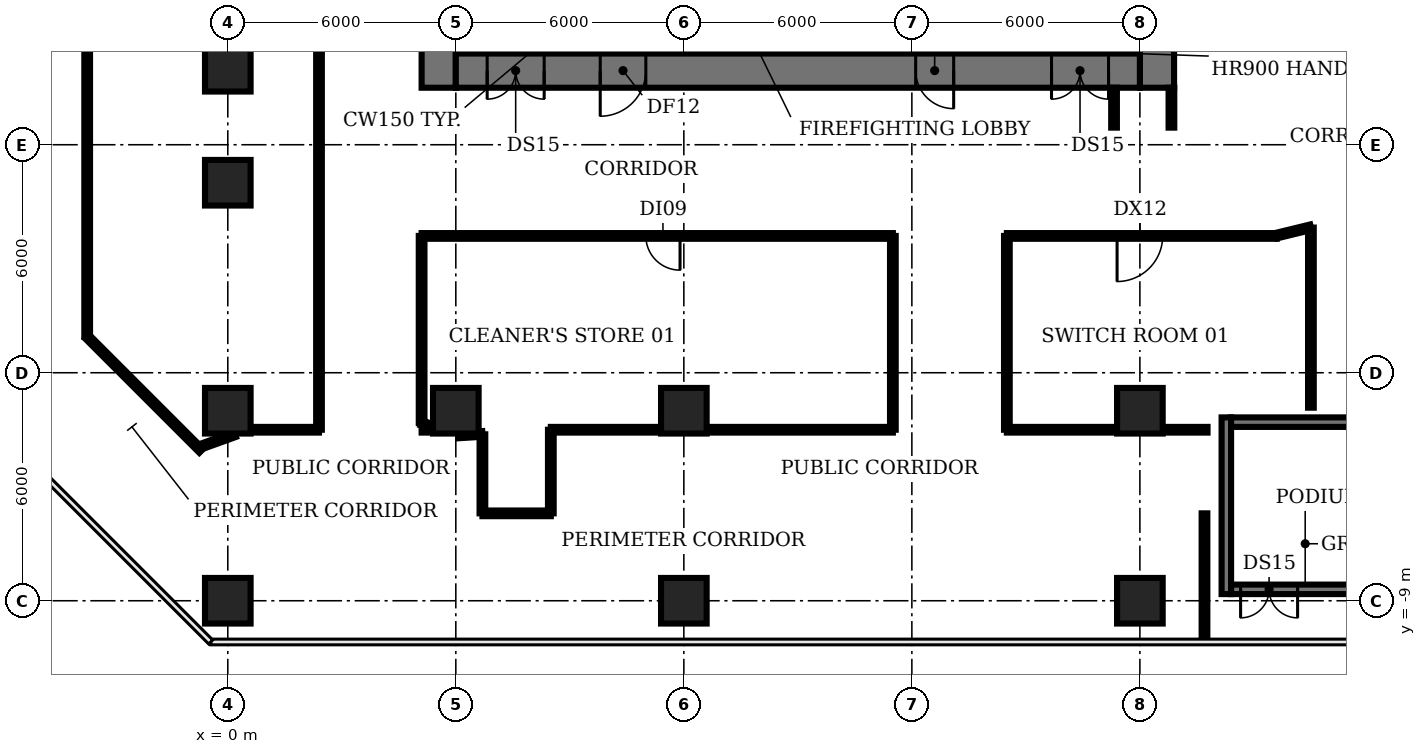
"""IFC4 building model, lengths in metres.
Left out: names, types, materials, properties, quantities, classifications, styles, units other than length and angle.
Written with IfcOpenShell. Run it as: python <this file> out.ifc"""

import sys

from ifc_helpers import new_model, si_unit, direction, frame, frame_2d, origin, origin_2d, place, context, subcontext, project, spatial, rectangle, extrude, element, fill, save


model = new_model("IFC4")
c1 = context("Model", 3, precision=1e-05, world=origin(), true_north=direction((0.0, 1.0)))
c2 = subcontext(c1, "Body", "Model", "MODEL_VIEW")
j1 = project(units=[si_unit("LENGTHUNIT", "METRE"), si_unit("PLANEANGLEUNIT", "RADIAN")], contexts=[c1])
p1 = place(None, origin())
s1 = spatial("IfcSite", under=j1, at=p1, CompositionType="ELEMENT")
p2 = place(p1, origin())
s2 = spatial("IfcBuilding", under=s1, at=p2, CompositionType="ELEMENT")
p3 = place(p2, frame((0.0, 0.0, 6.0)))
s3 = spatial("IfcBuildingStorey", under=s2, at=p3, CompositionType="ELEMENT", Elevation=6.0)
for number, where, z_axis, x_axis in (
    (1, (0.0, -9.0, 0.0), (0.0, 0.0, 1.0), (1.0, 0.0, 0.0)),
    (2, (0.0, -4.0, 0.0), (0.0, 0.0, 1.0), (1.0, 0.0, 0.0)),
    (3, (0.0, 2.0, 0.0), (0.0, 0.0, 1.0), (1.0, 0.0, 0.0)),
    (4, (0.0, 5.0, 0.0), (0.0, 0.0, 1.0), (1.0, 0.0, 0.0)),
    (5, (6.0, -4.0, 0.0), (0.0, 0.0, 1.0), (1.0, 0.0, 0.0)),
    (6, (12.0, -9.0, 0.0), (0.0, 0.0, 1.0), (1.0, 0.0, 0.0)),
    (7, (12.0, -4.0, 0.0), (0.0, 0.0, 1.0), (1.0, 0.0, 0.0)),
    (8, (24.0, -9.0, 0.0), (0.0, 0.0, 1.0), (1.0, 0.0, 0.0)),
    (9, (24.0, -4.0, 0.0), (0.0, 0.0, 1.0), (1.0, 0.0, 0.0)),
):
    element("IfcColumn", number, at=place(p3, frame(where, z_axis=z_axis, x_axis=x_axis)), inside=s3, PredefinedType="COLUMN", context=c2, shape_type="SweptSolid", body=[
        extrude(rectangle(XDim=1.2, YDim=1.2, at=origin_2d()), origin(), (0.0, 0.0, 1.0), 4.6),
    ])
p4 = place(p3, frame((9.275, 11.825, 0.0), z_axis=(0.0, 0.0, 1.0), x_axis=(0.0, -1.0, 0.0)))
e10 = element("IfcWall", 10, at=p4, inside=s3, PredefinedType="SHEAR", context=c2, shape_type="SweptSolid", body=[
    extrude(rectangle(XDim=6.425, YDim=0.25, at=frame_2d((3.212, 0.0))), origin(), (0.0, 0.0, 1.0), 4.6),
])
p5 = place(p4, frame((5.075, 0.0, 0.0)))
e11 = element("IfcOpeningElement", 11, at=p5, cuts=e10, PredefinedType="OPENING", context=c2, shape_type="SweptSolid", body=[
    extrude(rectangle(XDim=1.0, YDim=2.1, at=frame_2d((0.5, 1.05))), frame((0.0, 0.135, 0.0), z_axis=(0.0, -1.0, 0.0), x_axis=(1.0, 0.0, 0.0)), (0.0, 0.0, 1.0), 0.27),
])
p6 = place(p3, frame((13.5, 5.4, 0.0), z_axis=(0.0, 0.0, 1.0), x_axis=(0.0, 1.0, 0.0)))
e12 = element("IfcWall", 12, at=p6, inside=s3, PredefinedType="SHEAR", context=c2, shape_type="SweptSolid", body=[
    extrude(rectangle(XDim=8.2, YDim=0.2, at=frame_2d((4.1, 0.0))), origin(), (0.0, 0.0, 1.0), 4.6),
])
p7 = place(p6, frame((0.75, 0.0, 0.0)))
e13 = element("IfcOpeningElement", 13, at=p7, cuts=e12, PredefinedType="OPENING", context=c2, shape_type="SweptSolid", body=[
    extrude(rectangle(XDim=1.1, YDim=2.1, at=frame_2d((0.55, 1.05))), frame((0.0, 0.11, 0.0), z_axis=(0.0, -1.0, 0.0), x_axis=(1.0, 0.0, 0.0)), (0.0, 0.0, 1.0), 0.22),
])
p8 = place(p6, frame((3.55, 0.0, 0.0)))
e14 = element("IfcOpeningElement", 14, at=p8, cuts=e12, PredefinedType="OPENING", context=c2, shape_type="SweptSolid", body=[
    extrude(rectangle(XDim=1.1, YDim=2.1, at=frame_2d((0.55, 1.05))), frame((0.0, 0.11, 0.0), z_axis=(0.0, -1.0, 0.0), x_axis=(1.0, 0.0, 0.0)), (0.0, 0.0, 1.0), 0.22),
])
p9 = place(p6, frame((6.35, 0.0, 0.0)))
e15 = element("IfcOpeningElement", 15, at=p9, cuts=e12, PredefinedType="OPENING", context=c2, shape_type="SweptSolid", body=[
    extrude(rectangle(XDim=1.1, YDim=2.1, at=frame_2d((0.55, 1.05))), frame((0.0, 0.11, 0.0), z_axis=(0.0, -1.0, 0.0), x_axis=(1.0, 0.0, 0.0)), (0.0, 0.0, 1.0), 0.22),
])
p10 = place(p3, frame((16.5, 5.4, 0.0), z_axis=(0.0, 0.0, 1.0), x_axis=(0.0, 1.0, 0.0)))
e16 = element("IfcWall", 16, at=p10, inside=s3, PredefinedType="SHEAR", context=c2, shape_type="SweptSolid", body=[
    extrude(rectangle(XDim=8.2, YDim=0.2, at=frame_2d((4.1, 0.0))), origin(), (0.0, 0.0, 1.0), 4.6),
])
p11 = place(p3, frame((20.725, 5.4, 0.0), z_axis=(0.0, 0.0, 1.0), x_axis=(0.0, 1.0, 0.0)))
e17 = element("IfcWall", 17, at=p11, inside=s3, PredefinedType="SHEAR", context=c2, shape_type="SweptSolid", body=[
    extrude(rectangle(XDim=6.3, YDim=0.25, at=frame_2d((3.15, 0.0))), origin(), (0.0, 0.0, 1.0), 4.6),
])
p12 = place(p3, frame((5.55, 4.5, 0.0), z_axis=(0.0, 0.0, 1.0), x_axis=(0.0, 1.0, 0.0)))
e18 = element("IfcWall", 18, at=p12, inside=s3, PredefinedType="SHEAR", context=c2, shape_type="SweptSolid", body=[
    extrude(rectangle(XDim=21.2, YDim=0.9, at=frame_2d((10.6, 0.0))), origin(), (0.0, 0.0, 1.0), 4.6),
])
p13 = place(p12, frame((7.6, 0.0, 0.0)))
e19 = element("IfcOpeningElement", 19, at=p13, cuts=e18, PredefinedType="OPENING", context=c2, shape_type="SweptSolid", body=[
    extrude(rectangle(XDim=1.2, YDim=2.1, at=frame_2d((0.6, 1.05))), frame((0.0, 0.46, 0.0), z_axis=(0.0, -1.0, 0.0), x_axis=(1.0, 0.0, 0.0)), (0.0, 0.0, 1.0), 0.92),
])
p14 = place(p12, frame((14.15, 0.0, 0.0)))
e20 = element("IfcOpeningElement", 20, at=p14, cuts=e18, PredefinedType="OPENING", context=c2, shape_type="SweptSolid", body=[
    extrude(rectangle(XDim=1.2, YDim=2.1, at=frame_2d((0.6, 1.05))), frame((0.0, 0.46, 0.0), z_axis=(0.0, -1.0, 0.0), x_axis=(1.0, 0.0, 0.0)), (0.0, 0.0, 1.0), 0.92),
])
p15 = place(p3, frame((24.45, 25.7, 0.0), z_axis=(0.0, 0.0, 1.0), x_axis=(0.0, -1.0, 0.0)))
e21 = element("IfcWall", 21, at=p15, inside=s3, PredefinedType="SHEAR", context=c2, shape_type="SweptSolid", body=[
    extrude(rectangle(XDim=21.2, YDim=0.9, at=frame_2d((10.6, 0.0))), origin(), (0.0, 0.0, 1.0), 4.6),
])
p16 = place(p15, frame((12.45, 0.0, 0.0)))
e22 = element("IfcOpeningElement", 22, at=p16, cuts=e21, PredefinedType="OPENING", context=c2, shape_type="SweptSolid", body=[
    extrude(rectangle(XDim=0.9, YDim=2.1, at=frame_2d((0.45, 1.05))), frame((0.0, 0.46, 0.0), z_axis=(0.0, -1.0, 0.0), x_axis=(1.0, 0.0, 0.0)), (0.0, 0.0, 1.0), 0.92),
])
p17 = place(p15, frame((6.45, 0.0, 0.0)))
e23 = element("IfcOpeningElement", 23, at=p17, cuts=e21, PredefinedType="OPENING", context=c2, shape_type="SweptSolid", body=[
    extrude(rectangle(XDim=2.0, YDim=2.1, at=frame_2d((1.0, 1.05))), frame((0.0, 0.46, 0.0), z_axis=(0.0, -1.0, 0.0), x_axis=(1.0, 0.0, 0.0)), (0.0, 0.0, 1.0), 0.92),
])
p18 = place(p3, frame((24.0, 4.95, 0.0), z_axis=(0.0, 0.0, 1.0), x_axis=(-1.0, 0.0, 0.0)))
e24 = element("IfcWall", 24, at=p18, inside=s3, PredefinedType="SHEAR", context=c2, shape_type="SweptSolid", body=[
    extrude(rectangle(XDim=18.0, YDim=0.9, at=frame_2d((9.0, 0.0))), origin(), (0.0, 0.0, 1.0), 4.6),
])
p19 = place(p18, frame((15.675, 0.0, 0.0)))
e25 = element("IfcOpeningElement", 25, at=p19, cuts=e24, PredefinedType="OPENING", context=c2, shape_type="SweptSolid", body=[
    extrude(rectangle(XDim=1.5, YDim=2.1, at=frame_2d((0.75, 1.05))), frame((0.0, 0.46, 0.0), z_axis=(0.0, -1.0, 0.0), x_axis=(1.0, 0.0, 0.0)), (0.0, 0.0, 1.0), 0.92),
])
p20 = place(p18, frame((0.825, 0.0, 0.0)))
e26 = element("IfcOpeningElement", 26, at=p20, cuts=e24, PredefinedType="OPENING", context=c2, shape_type="SweptSolid", body=[
    extrude(rectangle(XDim=1.5, YDim=2.1, at=frame_2d((0.75, 1.05))), frame((0.0, 0.46, 0.0), z_axis=(0.0, -1.0, 0.0), x_axis=(1.0, 0.0, 0.0)), (0.0, 0.0, 1.0), 0.92),
])
p21 = place(p18, frame((13.0, 0.0, 0.0)))
e27 = element("IfcOpeningElement", 27, at=p21, cuts=e24, PredefinedType="OPENING", context=c2, shape_type="SweptSolid", body=[
    extrude(rectangle(XDim=1.2, YDim=2.1, at=frame_2d((0.6, 1.05))), frame((0.0, 0.46, 0.0), z_axis=(0.0, -1.0, 0.0), x_axis=(1.0, 0.0, 0.0)), (0.0, 0.0, 1.0), 0.92),
])
p22 = place(p18, frame((4.9, 0.0, 0.0)))
e28 = element("IfcOpeningElement", 28, at=p22, cuts=e24, PredefinedType="OPENING", context=c2, shape_type="SweptSolid", body=[
    extrude(rectangle(XDim=1.0, YDim=2.1, at=frame_2d((0.5, 1.05))), frame((0.0, 0.46, 0.0), z_axis=(0.0, -1.0, 0.0), x_axis=(1.0, 0.0, 0.0)), (0.0, 0.0, 1.0), 0.92),
])
p23 = place(p3, frame((26.275, -8.825, 0.0), z_axis=(0.0, 0.0, 1.0), x_axis=(0.0, 1.0, 0.0)))
e29 = element("IfcWall", 29, at=p23, inside=s3, PredefinedType="SHEAR", context=c2, shape_type="SweptSolid", body=[
    extrude(rectangle(XDim=4.65, YDim=0.25, at=frame_2d((2.325, 0.0))), origin(), (0.0, 0.0, 1.0), 4.6),
])
p24 = place(p3, frame((34.6, -8.7, 0.0), z_axis=(0.0, 0.0, 1.0), x_axis=(-1.0, 0.0, 0.0)))
e30 = element("IfcWall", 30, at=p24, inside=s3, PredefinedType="SHEAR", context=c2, shape_type="SweptSolid", body=[
    extrude(rectangle(XDim=8.2, YDim=0.25, at=frame_2d((4.1, 0.0))), origin(), (0.0, 0.0, 1.0), 4.6),
])
p25 = place(p24, frame((6.45, 0.0, 0.0)))
e31 = element("IfcOpeningElement", 31, at=p25, cuts=e30, PredefinedType="OPENING", context=c2, shape_type="SweptSolid", body=[
    extrude(rectangle(XDim=1.5, YDim=2.1, at=frame_2d((0.75, 1.05))), frame((0.0, 0.135, 0.0), z_axis=(0.0, -1.0, 0.0), x_axis=(1.0, 0.0, 0.0)), (0.0, 0.0, 1.0), 0.27),
])
p26 = place(p3, frame((26.4, -4.3, 0.0), z_axis=(0.0, 0.0, 1.0), x_axis=(1.0, 0.0, 0.0)))
e32 = element("IfcWall", 32, at=p26, inside=s3, PredefinedType="SHEAR", context=c2, shape_type="SweptSolid", body=[
    extrude(rectangle(XDim=8.2, YDim=0.25, at=frame_2d((4.1, 0.0))), origin(), (0.0, 0.0, 1.0), 4.6),
])
p27 = place(p3, frame((-3.7, -2.05, 0.0), z_axis=(0.0, 0.0, 1.0), x_axis=(0.707106781187, -0.707106781187, 0.0)))
e33 = element("IfcWall", 33, at=p27, inside=s3, PredefinedType="PARTITIONING", context=c2, shape_type="SweptSolid", body=[
    extrude(rectangle(XDim=4.249, YDim=0.15, at=frame_2d((2.125, 0.0))), origin(), (0.0, 0.0, 1.0), 3.18),
])
p28 = place(p3, frame((-3.7, 27.9, 0.0), z_axis=(0.0, 0.0, 1.0), x_axis=(0.0, -1.0, 0.0)))
e34 = element("IfcWall", 34, at=p28, inside=s3, PredefinedType="PARTITIONING", context=c2, shape_type="SweptSolid", body=[
    extrude(rectangle(XDim=29.95, YDim=0.15, at=frame_2d((14.975, 0.0))), origin(), (0.0, 0.0, 1.0), 3.18),
])
p29 = place(p28, frame((11.45, 0.0, 0.0)))
e35 = element("IfcOpeningElement", 35, at=p29, cuts=e34, PredefinedType="OPENING", context=c2, shape_type="SweptSolid", body=[
    extrude(rectangle(XDim=0.9, YDim=2.1, at=frame_2d((0.45, 1.05))), frame((0.0, 0.085, 0.0), z_axis=(0.0, -1.0, 0.0), x_axis=(1.0, 0.0, 0.0)), (0.0, 0.0, 1.0), 0.17),
])
p30 = place(p3, frame((-0.78, -4.97, 0.0), z_axis=(0.0, 0.0, 1.0), x_axis=(0.940681994894, 0.339289528991, 0.0)))
e36 = element("IfcWall", 36, at=p30, inside=s3, PredefinedType="PARTITIONING", context=c2, shape_type="SweptSolid", body=[
    extrude(rectangle(XDim=1.031, YDim=0.15, at=frame_2d((0.516, 0.0))), origin(), (0.0, 0.0, 1.0), 3.18),
])
p31 = place(p3, frame((0.46, -4.5, 0.0), z_axis=(0.0, 0.0, 1.0), x_axis=(1.0, 0.0, 0.0)))
e37 = element("IfcWall", 37, at=p31, inside=s3, PredefinedType="PARTITIONING", context=c2, shape_type="SweptSolid", body=[
    extrude(rectangle(XDim=1.94, YDim=0.15, at=frame_2d((0.97, 0.0))), origin(), (0.0, 0.0, 1.0), 3.18),
])
p32 = place(p3, frame((2.4, -4.5, 0.0), z_axis=(0.0, 0.0, 1.0), x_axis=(0.0, 1.0, 0.0)))
e38 = element("IfcWall", 38, at=p32, inside=s3, PredefinedType="PARTITIONING", context=c2, shape_type="SweptSolid", body=[
    extrude(rectangle(XDim=32.4, YDim=0.15, at=frame_2d((16.2, 0.0))), origin(), (0.0, 0.0, 1.0), 3.18),
])
p33 = place(p3, frame((5.1, -4.5, 0.0), z_axis=(0.0, 0.0, 1.0), x_axis=(1.0, 0.0, 0.0)))
e39 = element("IfcWall", 39, at=p33, inside=s3, PredefinedType="PARTITIONING", context=c2, shape_type="SweptSolid", body=[
    extrude(rectangle(XDim=0.44, YDim=0.15, at=frame_2d((0.22, 0.0))), origin(), (0.0, 0.0, 1.0), 3.18),
])
p34 = place(p3, frame((5.1, -4.32, 0.0), z_axis=(0.0, 0.0, 1.0), x_axis=(0.0, 1.0, 0.0)))
e40 = element("IfcWall", 40, at=p34, inside=s3, PredefinedType="PARTITIONING", context=c2, shape_type="SweptSolid", body=[
    extrude(rectangle(XDim=4.92, YDim=0.15, at=frame_2d((2.46, 0.0))), origin(), (0.0, 0.0, 1.0), 3.18),
])
p35 = place(p3, frame((5.1, -4.32, 0.0), z_axis=(0.0, 0.0, 1.0), x_axis=(0.925579680267, -0.378552843705, 0.0)))
e41 = element("IfcWall", 41, at=p35, inside=s3, PredefinedType="PARTITIONING", context=c2, shape_type="SweptSolid", body=[
    extrude(rectangle(XDim=0.475, YDim=0.15, at=frame_2d((0.238, 0.0))), origin(), (0.0, 0.0, 1.0), 3.18),
])
p36 = place(p3, frame((6.06, -4.65, 0.0), z_axis=(0.0, 0.0, 1.0), x_axis=(0.998071793058, 0.062070088618, 0.0)))
e42 = element("IfcWall", 42, at=p36, inside=s3, PredefinedType="PARTITIONING", context=c2, shape_type="SweptSolid", body=[
    extrude(rectangle(XDim=0.641, YDim=0.15, at=frame_2d((0.321, 0.0))), origin(), (0.0, 0.0, 1.0), 3.18),
])
p37 = place(p3, frame((6.7, -6.7, 0.0), z_axis=(0.0, 0.0, 1.0), x_axis=(0.0, 1.0, 0.0)))
e43 = element("IfcWall", 43, at=p37, inside=s3, PredefinedType="PARTITIONING", context=c2, shape_type="SweptSolid", body=[
    extrude(rectangle(XDim=2.08, YDim=0.15, at=frame_2d((1.04, 0.0))), origin(), (0.0, 0.0, 1.0), 3.18),
])
p38 = place(p3, frame((6.7, -6.7, 0.0), z_axis=(0.0, 0.0, 1.0), x_axis=(1.0, 0.0, 0.0)))
e44 = element("IfcWall", 44, at=p38, inside=s3, PredefinedType="PARTITIONING", context=c2, shape_type="SweptSolid", body=[
    extrude(rectangle(XDim=1.8, YDim=0.15, at=frame_2d((0.9, 0.0))), origin(), (0.0, 0.0, 1.0), 3.18),
])
p39 = place(p3, frame((8.5, -6.7, 0.0), z_axis=(0.0, 0.0, 1.0), x_axis=(0.0, 1.0, 0.0)))
e45 = element("IfcWall", 45, at=p39, inside=s3, PredefinedType="PARTITIONING", context=c2, shape_type="SweptSolid", body=[
    extrude(rectangle(XDim=2.2, YDim=0.15, at=frame_2d((1.1, 0.0))), origin(), (0.0, 0.0, 1.0), 3.18),
])
p40 = place(p3, frame((8.5, -4.5, 0.0), z_axis=(0.0, 0.0, 1.0), x_axis=(1.0, 0.0, 0.0)))
e46 = element("IfcWall", 46, at=p40, inside=s3, PredefinedType="PARTITIONING", context=c2, shape_type="SweptSolid", body=[
    extrude(rectangle(XDim=3.04, YDim=0.15, at=frame_2d((1.52, 0.0))), origin(), (0.0, 0.0, 1.0), 3.18),
])
p41 = place(p3, frame((12.46, -4.5, 0.0), z_axis=(0.0, 0.0, 1.0), x_axis=(1.0, 0.0, 0.0)))
e47 = element("IfcWall", 47, at=p41, inside=s3, PredefinedType="PARTITIONING", context=c2, shape_type="SweptSolid", body=[
    extrude(rectangle(XDim=5.04, YDim=0.15, at=frame_2d((2.52, 0.0))), origin(), (0.0, 0.0, 1.0), 3.18),
])
p42 = place(p3, frame((17.5, -4.5, 0.0), z_axis=(0.0, 0.0, 1.0), x_axis=(0.0, 1.0, 0.0)))
e48 = element("IfcWall", 48, at=p42, inside=s3, PredefinedType="PARTITIONING", context=c2, shape_type="SweptSolid", body=[
    extrude(rectangle(XDim=5.1, YDim=0.15, at=frame_2d((2.55, 0.0))), origin(), (0.0, 0.0, 1.0), 3.18),
])
p43 = place(p3, frame((17.5, 0.6, 0.0), z_axis=(0.0, 0.0, 1.0), x_axis=(-1.0, 0.0, 0.0)))
e49 = element("IfcWall", 49, at=p43, inside=s3, PredefinedType="PARTITIONING", context=c2, shape_type="SweptSolid", body=[
    extrude(rectangle(XDim=12.4, YDim=0.15, at=frame_2d((6.2, 0.0))), origin(), (0.0, 0.0, 1.0), 3.18),
])
p44 = place(p43, frame((5.6, 0.0, 0.0)))
e50 = element("IfcOpeningElement", 50, at=p44, cuts=e49, PredefinedType="OPENING", context=c2, shape_type="SweptSolid", body=[
    extrude(rectangle(XDim=0.9, YDim=2.1, at=frame_2d((0.45, 1.05))), frame((0.0, 0.085, 0.0), z_axis=(0.0, -1.0, 0.0), x_axis=(1.0, 0.0, 0.0)), (0.0, 0.0, 1.0), 0.17),
])
p45 = place(p3, frame((20.5, -4.5, 0.0), z_axis=(0.0, 0.0, 1.0), x_axis=(0.0, 1.0, 0.0)))
e51 = element("IfcWall", 51, at=p45, inside=s3, PredefinedType="PARTITIONING", context=c2, shape_type="SweptSolid", body=[
    extrude(rectangle(XDim=5.1, YDim=0.15, at=frame_2d((2.55, 0.0))), origin(), (0.0, 0.0, 1.0), 3.18),
])
p46 = place(p3, frame((20.5, -4.5, 0.0), z_axis=(0.0, 0.0, 1.0), x_axis=(1.0, 0.0, 0.0)))
e52 = element("IfcWall", 52, at=p46, inside=s3, PredefinedType="PARTITIONING", context=c2, shape_type="SweptSolid", body=[
    extrude(rectangle(XDim=3.04, YDim=0.15, at=frame_2d((1.52, 0.0))), origin(), (0.0, 0.0, 1.0), 3.18),
])
p47 = place(p3, frame((23.32, 3.45, 0.0), z_axis=(0.0, 0.0, 1.0), x_axis=(0.0, 1.0, 0.0)))
e53 = element("IfcWall", 53, at=p47, inside=s3, PredefinedType="PARTITIONING", context=c2, shape_type="SweptSolid", body=[
    extrude(rectangle(XDim=1.05, YDim=0.15, at=frame_2d((0.525, 0.0))), origin(), (0.0, 0.0, 1.0), 3.18),
])
p48 = place(p3, frame((24.46, -4.5, 0.0), z_axis=(0.0, 0.0, 1.0), x_axis=(1.0, 0.0, 0.0)))
e54 = element("IfcWall", 54, at=p48, inside=s3, PredefinedType="PARTITIONING", context=c2, shape_type="SweptSolid", body=[
    extrude(rectangle(XDim=1.32, YDim=0.15, at=frame_2d((0.66, 0.0))), origin(), (0.0, 0.0, 1.0), 3.18),
])
p49 = place(p3, frame((24.83, 3.45, 0.0), z_axis=(0.0, 0.0, 1.0), x_axis=(0.0, 1.0, 0.0)))
e55 = element("IfcWall", 55, at=p49, inside=s3, PredefinedType="PARTITIONING", context=c2, shape_type="SweptSolid", body=[
    extrude(rectangle(XDim=1.05, YDim=0.15, at=frame_2d((0.525, 0.0))), origin(), (0.0, 0.0, 1.0), 3.18),
])
p50 = place(p3, frame((25.7, -10.03, 0.0), z_axis=(0.0, 0.0, 1.0), x_axis=(0.0, 1.0, 0.0)))
e56 = element("IfcWall", 56, at=p50, inside=s3, PredefinedType="PARTITIONING", context=c2, shape_type="SweptSolid", body=[
    extrude(rectangle(XDim=3.33, YDim=0.15, at=frame_2d((1.665, 0.0))), origin(), (0.0, 0.0, 1.0), 3.18),
])
p51 = place(p3, frame((27.6, 0.6, 0.0), z_axis=(0.0, 0.0, 1.0), x_axis=(-1.0, 0.0, 0.0)))
e57 = element("IfcWall", 57, at=p51, inside=s3, PredefinedType="PARTITIONING", context=c2, shape_type="SweptSolid", body=[
    extrude(rectangle(XDim=7.1, YDim=0.15, at=frame_2d((3.55, 0.0))), origin(), (0.0, 0.0, 1.0), 3.18),
])
p52 = place(p51, frame((3.0, 0.0, 0.0)))
e58 = element("IfcOpeningElement", 58, at=p52, cuts=e57, PredefinedType="OPENING", context=c2, shape_type="SweptSolid", body=[
    extrude(rectangle(XDim=1.2, YDim=2.1, at=frame_2d((0.6, 1.05))), frame((0.0, 0.085, 0.0), z_axis=(0.0, -1.0, 0.0), x_axis=(1.0, 0.0, 0.0)), (0.0, 0.0, 1.0), 0.17),
])
p53 = place(p3, frame((27.6, 0.61, 0.0), z_axis=(0.0, 0.0, 1.0), x_axis=(0.971400357327, 0.237447564284, 0.0)))
e59 = element("IfcWall", 59, at=p53, inside=s3, PredefinedType="PARTITIONING", context=c2, shape_type="SweptSolid", body=[
    extrude(rectangle(XDim=0.927, YDim=0.15, at=frame_2d((0.463, 0.0))), origin(), (0.0, 0.0, 1.0), 3.18),
])
p54 = place(p3, frame((28.5, -3.92, 0.0), z_axis=(0.0, 0.0, 1.0), x_axis=(0.0, 1.0, 0.0)))
e60 = element("IfcWall", 60, at=p54, inside=s3, PredefinedType="PARTITIONING", context=c2, shape_type="SweptSolid", body=[
    extrude(rectangle(XDim=4.74, YDim=0.15, at=frame_2d((2.37, 0.0))), origin(), (0.0, 0.0, 1.0), 3.18),
])
p55 = place(p19, origin())
e61 = element("IfcDoor", 61, at=p55, inside=s3, OperationType="DOUBLE_DOOR_SINGLE_SWING", PredefinedType="DOOR", context=c2, shape_type="SweptSolid", body=[
    extrude(rectangle(XDim=1.5, YDim=2.1, at=frame_2d((0.75, 1.05))), frame((0.0, 0.025, 0.0), z_axis=(0.0, -1.0, 0.0), x_axis=(1.0, 0.0, 0.0)), (0.0, 0.0, 1.0), 0.05),
])
fill(e25, e61)
p56 = place(p20, origin())
e62 = element("IfcDoor", 62, at=p56, inside=s3, OperationType="DOUBLE_DOOR_SINGLE_SWING", PredefinedType="DOOR", context=c2, shape_type="SweptSolid", body=[
    extrude(rectangle(XDim=1.5, YDim=2.1, at=frame_2d((0.75, 1.05))), frame((0.0, 0.025, 0.0), z_axis=(0.0, -1.0, 0.0), x_axis=(1.0, 0.0, 0.0)), (0.0, 0.0, 1.0), 0.05),
])
fill(e26, e62)
p57 = place(p21, origin())
e63 = element("IfcDoor", 63, at=p57, inside=s3, OperationType="SINGLE_SWING_RIGHT", PredefinedType="DOOR", context=c2, shape_type="SweptSolid", body=[
    extrude(rectangle(XDim=1.2, YDim=2.1, at=frame_2d((0.6, 1.05))), frame((0.0, 0.025, 0.0), z_axis=(0.0, -1.0, 0.0), x_axis=(1.0, 0.0, 0.0)), (0.0, 0.0, 1.0), 0.05),
])
fill(e27, e63)
p58 = place(p22, origin())
e64 = element("IfcDoor", 64, at=p58, inside=s3, OperationType="SINGLE_SWING_LEFT", PredefinedType="DOOR", context=c2, shape_type="SweptSolid", body=[
    extrude(rectangle(XDim=1.0, YDim=2.1, at=frame_2d((0.5, 1.05))), frame((0.0, -0.39, 0.0), z_axis=(0.0, -1.0, 0.0), x_axis=(1.0, 0.0, 0.0)), (0.0, 0.0, 1.0), 0.05),
])
fill(e28, e64)
p59 = place(p25, origin())
e65 = element("IfcDoor", 65, at=p59, inside=s3, OperationType="DOUBLE_DOOR_SINGLE_SWING", PredefinedType="DOOR", context=c2, shape_type="SweptSolid", body=[
    extrude(rectangle(XDim=1.5, YDim=2.1, at=frame_2d((0.75, 1.05))), frame((0.0, 0.025, 0.0), z_axis=(0.0, -1.0, 0.0), x_axis=(1.0, 0.0, 0.0)), (0.0, 0.0, 1.0), 0.05),
])
fill(e31, e65)
p60 = place(p44, origin())
e66 = element("IfcDoor", 66, at=p60, inside=s3, OperationType="SINGLE_SWING_LEFT", PredefinedType="DOOR", context=c2, shape_type="SweptSolid", body=[
    extrude(rectangle(XDim=0.9, YDim=2.1, at=frame_2d((0.45, 1.05))), frame((0.0, 0.025, 0.0), z_axis=(0.0, -1.0, 0.0), x_axis=(1.0, 0.0, 0.0)), (0.0, 0.0, 1.0), 0.05),
])
fill(e50, e66)
p61 = place(p52, origin())
e67 = element("IfcDoor", 67, at=p61, inside=s3, OperationType="SINGLE_SWING_RIGHT", PredefinedType="DOOR", context=c2, shape_type="SweptSolid", body=[
    extrude(rectangle(XDim=1.2, YDim=2.1, at=frame_2d((0.6, 1.05))), frame((0.0, 0.025, 0.0), z_axis=(0.0, -1.0, 0.0), x_axis=(1.0, 0.0, 0.0)), (0.0, 0.0, 1.0), 0.05),
])
fill(e58, e67)
save(model, sys.argv[1])
